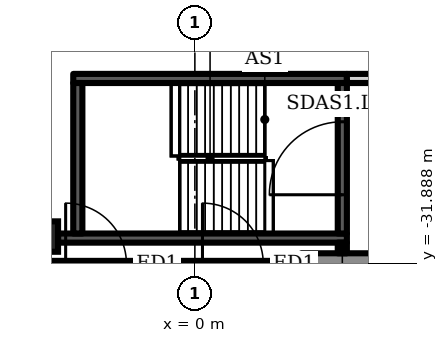
"""IFC4 building model, lengths in metres.
Left out: names, types, materials, properties, quantities, classifications, styles, units other than length and angle.
Written with IfcOpenShell. Run it as: python <this file> out.ifc"""

import sys

from ifc_helpers import new_model, si_unit, direction, frame, frame_2d, origin, origin_2d, place, context, subcontext, project, spatial, rectangle, extrude, element, fill, save


model = new_model("IFC4")
c1 = context("Model", 3, precision=1e-05, world=origin(), true_north=direction((0.0, 1.0)))
c2 = subcontext(c1, "Body", "Model", "MODEL_VIEW")
j1 = project(units=[si_unit("LENGTHUNIT", "METRE"), si_unit("PLANEANGLEUNIT", "RADIAN")], contexts=[c1])
p1 = place(None, origin())
s1 = spatial("IfcSite", under=j1, at=p1, CompositionType="ELEMENT")
p2 = place(p1, origin())
s2 = spatial("IfcBuilding", under=s1, at=p2, CompositionType="ELEMENT")
p3 = place(p2, origin())
s3 = spatial("IfcBuildingStorey", under=s2, at=p3, CompositionType="ELEMENT", Elevation=0.0)
p4 = place(p3, frame((-5.0, -31.0, 0.0), z_axis=(0.0, 0.0, 1.0), x_axis=(1.0, 0.0, 0.0)))
e1 = element("IfcColumn", 1, at=p4, inside=s3, PredefinedType="COLUMN", context=c2, shape_type="SweptSolid", body=[
    extrude(rectangle(XDim=1.0, YDim=1.0, at=origin_2d()), origin(), (0.0, 0.0, 1.0), 8.0),
])
p5 = place(p3, frame((3.5, -31.775, 0.0), z_axis=(0.0, 0.0, 1.0), x_axis=(1.0, 0.0, 0.0)))
e2 = element("IfcWall", 2, at=p5, inside=s3, PredefinedType="SOLIDWALL", context=c2, shape_type="SweptSolid", body=[
    extrude(rectangle(XDim=26.5, YDim=0.45, at=frame_2d((13.25, 0.0))), origin(), (0.0, 0.0, 1.0), 7.7),
])
p6 = place(p5, frame((3.6, 0.0, 0.0)))
e3 = element("IfcOpeningElement", 3, at=p6, cuts=e2, PredefinedType="OPENING", context=c2, shape_type="SweptSolid", body=[
    extrude(rectangle(XDim=1.8, YDim=2.4, at=frame_2d((0.9, 1.2))), frame((0.0, 0.235, 0.0), z_axis=(0.0, -1.0, 0.0), x_axis=(1.0, 0.0, 0.0)), (0.0, 0.0, 1.0), 0.47),
])
p7 = place(p5, frame((13.6, 0.0, 0.0)))
e4 = element("IfcOpeningElement", 4, at=p7, cuts=e2, PredefinedType="OPENING", context=c2, shape_type="SweptSolid", body=[
    extrude(rectangle(XDim=1.8, YDim=2.4, at=frame_2d((0.9, 1.2))), frame((0.0, 0.235, 0.0), z_axis=(0.0, -1.0, 0.0), x_axis=(1.0, 0.0, 0.0)), (0.0, 0.0, 1.0), 0.47),
])
p8 = place(p3, frame((-5.5, -31.9, 0.0), z_axis=(0.0, 0.0, 1.0), x_axis=(1.0, 0.0, 0.0)))
e5 = element("IfcWall", 5, at=p8, inside=s3, PredefinedType="SOLIDWALL", context=c2, shape_type="SweptSolid", body=[
    extrude(rectangle(XDim=9.0, YDim=0.2, at=frame_2d((4.5, 0.0))), origin(), (0.0, 0.0, 1.0), 2.6),
])
p9 = place(p8, frame((1.25, 0.0, 0.0)))
e6 = element("IfcOpeningElement", 6, at=p9, cuts=e5, PredefinedType="OPENING", context=c2, shape_type="SweptSolid", body=[
    extrude(rectangle(XDim=2.0, YDim=2.4, at=frame_2d((1.0, 1.2))), frame((0.0, 0.11, 0.0), z_axis=(0.0, -1.0, 0.0), x_axis=(1.0, 0.0, 0.0)), (0.0, 0.0, 1.0), 0.22),
])
p10 = place(p8, frame((5.75, 0.0, 0.0)))
e7 = element("IfcOpeningElement", 7, at=p10, cuts=e5, PredefinedType="OPENING", context=c2, shape_type="SweptSolid", body=[
    extrude(rectangle(XDim=2.0, YDim=2.4, at=frame_2d((1.0, 1.2))), frame((0.0, 0.11, 0.0), z_axis=(0.0, -1.0, 0.0), x_axis=(1.0, 0.0, 0.0)), (0.0, 0.0, 1.0), 0.22),
])
p11 = place(p3, frame((-4.5, -31.05, 0.0), z_axis=(0.0, 0.0, 1.0), x_axis=(1.0, 0.0, 0.0)))
e8 = element("IfcWall", 8, at=p11, inside=s3, PredefinedType="SHEAR", context=c2, shape_type="SweptSolid", body=[
    extrude(rectangle(XDim=9.5, YDim=0.3, at=frame_2d((4.75, 0.0))), origin(), (0.0, 0.0, 1.0), 7.7),
])
p12 = place(p3, frame((-4.0, -25.8, 0.0), z_axis=(0.0, 0.0, 1.0), x_axis=(1.0, 0.0, 0.0)))
e9 = element("IfcWall", 9, at=p12, inside=s3, PredefinedType="SHEAR", context=c2, shape_type="SweptSolid", body=[
    extrude(rectangle(XDim=9.0, YDim=0.3, at=frame_2d((4.5, 0.0))), origin(), (0.0, 0.0, 1.0), 7.7),
])
p13 = place(p3, frame((-3.85, -30.9, 0.0), z_axis=(0.0, 0.0, 1.0), x_axis=(0.0, 1.0, 0.0)))
e10 = element("IfcWall", 10, at=p13, inside=s3, PredefinedType="SHEAR", context=c2, shape_type="SweptSolid", body=[
    extrude(rectangle(XDim=4.95, YDim=0.3, at=frame_2d((2.475, 0.0))), origin(), (0.0, 0.0, 1.0), 7.7),
])
p14 = place(p3, frame((4.85, -30.9, 0.0), z_axis=(0.0, 0.0, 1.0), x_axis=(0.0, 1.0, 0.0)))
e11 = element("IfcWall", 11, at=p14, inside=s3, PredefinedType="SHEAR", context=c2, shape_type="SweptSolid", body=[
    extrude(rectangle(XDim=4.95, YDim=0.3, at=frame_2d((2.475, 0.0))), origin(), (0.0, 0.0, 1.0), 7.7),
])
p15 = place(p14, frame((1.275, 0.0, 0.0)))
e12 = element("IfcOpeningElement", 12, at=p15, cuts=e11, PredefinedType="OPENING", context=c2, shape_type="SweptSolid", body=[
    extrude(rectangle(XDim=2.4, YDim=2.1, at=frame_2d((1.2, 1.05))), frame((0.0, 0.16, 0.0), z_axis=(0.0, -1.0, 0.0), x_axis=(1.0, 0.0, 0.0)), (0.0, 0.0, 1.0), 0.32),
])
p16 = place(p3, frame((5.0, -25.8, 0.0), z_axis=(0.0, 0.0, 1.0), x_axis=(1.0, 0.0, 0.0)))
e13 = element("IfcWall", 13, at=p16, inside=s3, PredefinedType="PARTITIONING", context=c2, shape_type="SweptSolid", body=[
    extrude(rectangle(XDim=4.0, YDim=0.3, at=frame_2d((2.0, 0.0))), origin(), (0.0, 0.0, 1.0), 7.7),
])
p17 = place(p3, frame((4.85, -31.55, 0.0), z_axis=(0.0, 0.0, 1.0), x_axis=(0.0, 1.0, 0.0)))
e14 = element("IfcWall", 14, at=p17, inside=s3, PredefinedType="PARTITIONING", context=c2, shape_type="SweptSolid", body=[
    extrude(rectangle(XDim=0.35, YDim=0.3, at=frame_2d((0.175, 0.0))), origin(), (0.0, 0.0, 1.0), 7.7),
])
p18 = place(p9, origin())
e15 = element("IfcDoor", 15, at=p18, inside=s3, OperationType="DOUBLE_DOOR_DOUBLE_SWING", PredefinedType="DOOR", context=c2, shape_type="SweptSolid", body=[
    extrude(rectangle(XDim=2.0, YDim=2.4, at=frame_2d((1.0, 1.2))), frame((0.0, 0.025, 0.0), z_axis=(0.0, -1.0, 0.0), x_axis=(1.0, 0.0, 0.0)), (0.0, 0.0, 1.0), 0.05),
])
fill(e6, e15)
p19 = place(p10, origin())
e16 = element("IfcDoor", 16, at=p19, inside=s3, OperationType="DOUBLE_DOOR_DOUBLE_SWING", PredefinedType="DOOR", context=c2, shape_type="SweptSolid", body=[
    extrude(rectangle(XDim=2.0, YDim=2.4, at=frame_2d((1.0, 1.2))), frame((0.0, 0.025, 0.0), z_axis=(0.0, -1.0, 0.0), x_axis=(1.0, 0.0, 0.0)), (0.0, 0.0, 1.0), 0.05),
])
fill(e7, e16)
p20 = place(p15, origin())
e17 = element("IfcDoor", 17, at=p20, inside=s3, OperationType="DOUBLE_DOOR_SINGLE_SWING", PredefinedType="DOOR", context=c2, shape_type="SweptSolid", body=[
    extrude(rectangle(XDim=2.4, YDim=2.1, at=frame_2d((1.2, 1.05))), frame((0.0, 0.025, 0.0), z_axis=(0.0, -1.0, 0.0), x_axis=(1.0, 0.0, 0.0)), (0.0, 0.0, 1.0), 0.05),
])
fill(e12, e17)
save(model, sys.argv[1])
